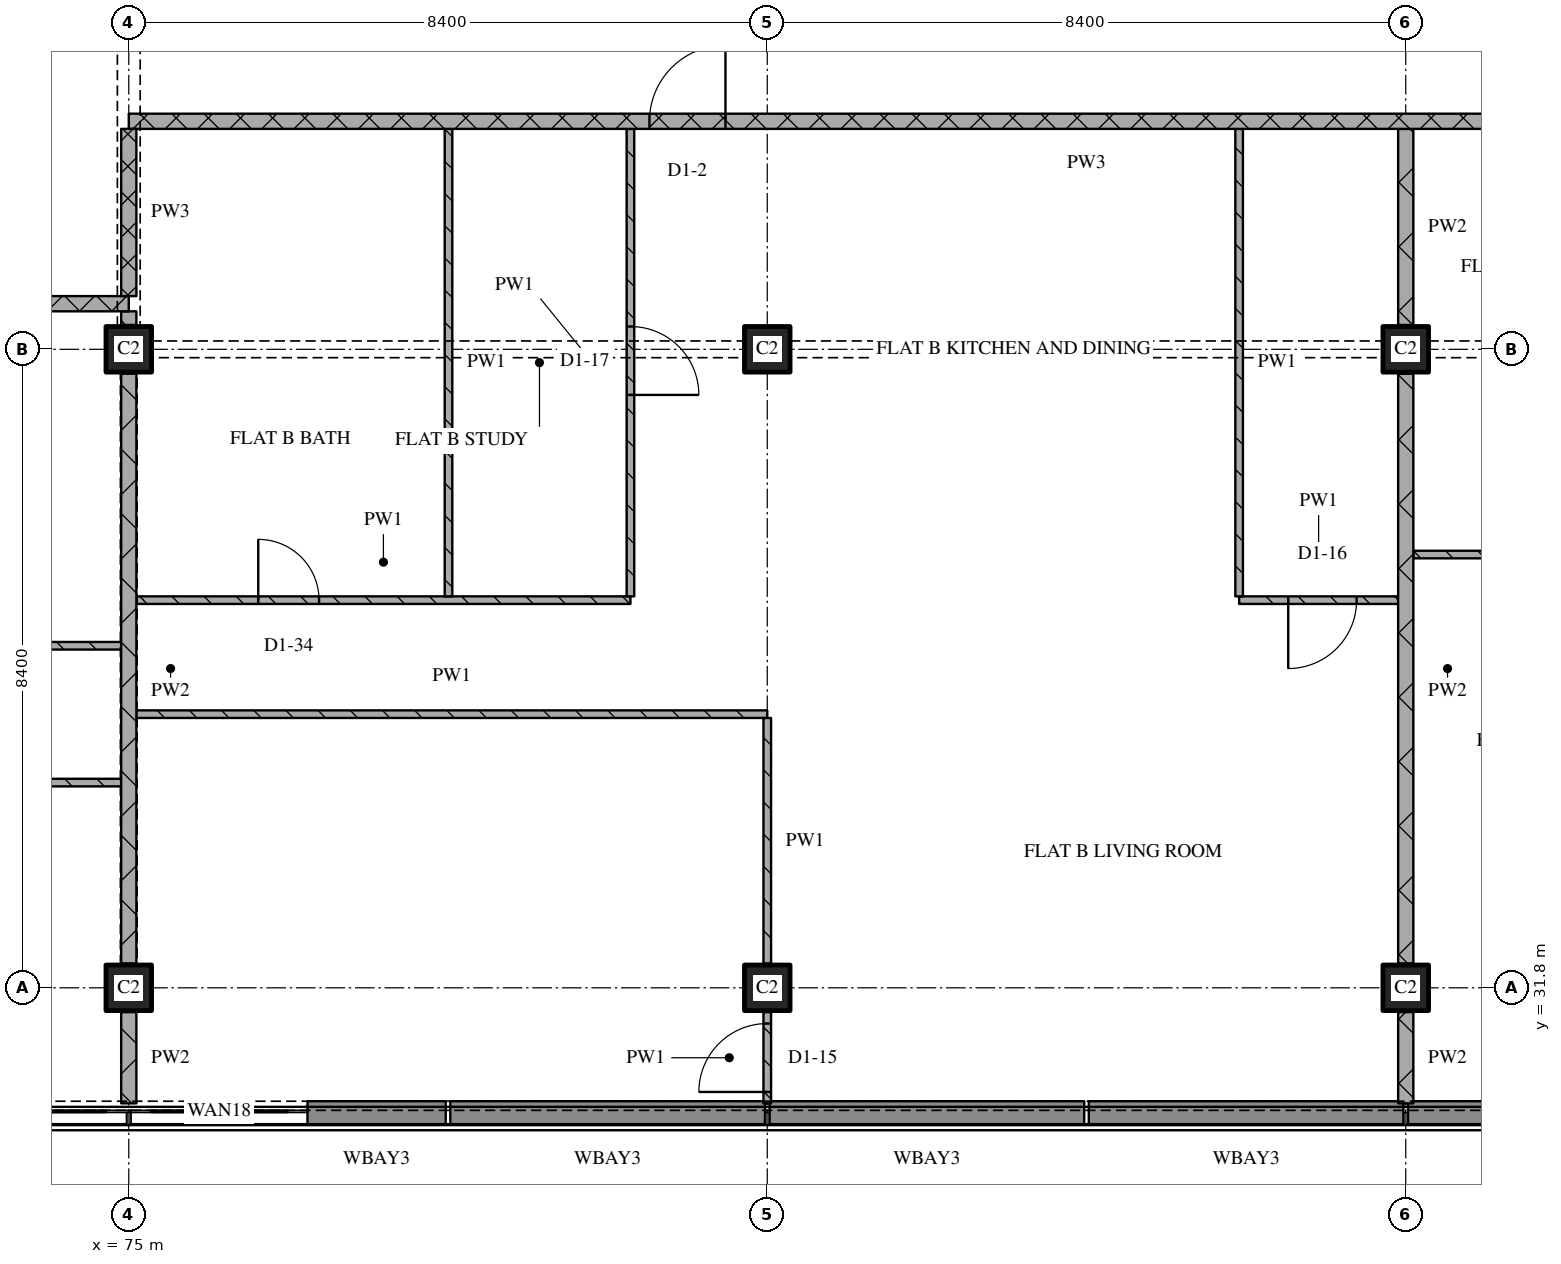
"""IFC4 building model, lengths in metres.
Left out: names, types, materials, properties, quantities, classifications, styles, units other than length and angle.
Written with IfcOpenShell. Run it as: python <this file> out.ifc"""

import sys

from ifc_helpers import new_model, si_unit, direction, frame, frame_2d, origin, origin_2d, place, context, subcontext, project, spatial, rectangle, extrude, element, fill, save


model = new_model("IFC4")
c1 = context("Model", 3, precision=1e-05, world=origin(), true_north=direction((0.0, 1.0)))
c2 = subcontext(c1, "Body", "Model", "MODEL_VIEW")
j1 = project(units=[si_unit("LENGTHUNIT", "METRE"), si_unit("PLANEANGLEUNIT", "RADIAN")], contexts=[c1])
p1 = place(None, origin())
s1 = spatial("IfcSite", under=j1, at=p1, CompositionType="ELEMENT")
p2 = place(p1, origin())
s2 = spatial("IfcBuilding", under=s1, at=p2, CompositionType="ELEMENT")
p3 = place(p2, frame((0.0, 0.0, 205.5)))
s3 = spatial("IfcBuildingStorey", under=s2, at=p3, CompositionType="ELEMENT", Elevation=205.5)
for number, where, z_axis, x_axis in (
    (1, (75.0, 31.8, 0.0), (0.0, 0.0, 1.0), (1.0, 0.0, 0.0)),
    (2, (75.0, 40.2, 0.0), (0.0, 0.0, 1.0), (1.0, 0.0, 0.0)),
    (3, (83.4, 31.8, 0.0), (0.0, 0.0, 1.0), (1.0, 0.0, 0.0)),
    (4, (83.4, 40.2, 0.0), (0.0, 0.0, 1.0), (1.0, 0.0, 0.0)),
    (5, (91.8, 31.8, 0.0), (0.0, 0.0, 1.0), (1.0, 0.0, 0.0)),
    (6, (91.8, 40.2, 0.0), (0.0, 0.0, 1.0), (1.0, 0.0, 0.0)),
):
    element("IfcColumn", number, at=place(p3, frame(where, z_axis=z_axis, x_axis=x_axis)), inside=s3, PredefinedType="COLUMN", context=c2, shape_type="SweptSolid", body=[
        extrude(rectangle(XDim=0.6, YDim=0.6, at=origin_2d()), origin(), (0.0, 0.0, 1.0), 3.6),
    ])
p4 = place(p3, frame((79.17, 30.154, 0.0), z_axis=(0.0, 0.0, 1.0), x_axis=(-1.0, 0.0, 0.0)))
e7 = element("IfcWall", 7, at=p4, inside=s3, PredefinedType="SOLIDWALL", context=c2, shape_type="SweptSolid", body=[
    extrude(rectangle(XDim=1.819, YDim=0.308, at=frame_2d((0.91, 0.0))), origin(), (0.0, 0.0, 1.0), 3.2),
])
for number, where, z_axis, x_axis in (
    (8, (83.37, 30.154, 0.0), (0.0, 0.0, 1.0), (-1.0, 0.0, 0.0)),
    (9, (87.57, 30.154, 0.0), (0.0, 0.0, 1.0), (-1.0, 0.0, 0.0)),
    (10, (91.77, 30.154, 0.0), (0.0, 0.0, 1.0), (-1.0, 0.0, 0.0)),
):
    element("IfcWall", number, at=place(p3, frame(where, z_axis=z_axis, x_axis=x_axis)), inside=s3, PredefinedType="SOLIDWALL", context=c2, shape_type="SweptSolid", body=[
        extrude(rectangle(XDim=4.14, YDim=0.308, at=frame_2d((2.07, 0.0))), origin(), (0.0, 0.0, 1.0), 3.2),
    ])
p5 = place(p3, frame((95.97, 30.154, 0.0), z_axis=(0.0, 0.0, 1.0), x_axis=(-1.0, 0.0, 0.0)))
e11 = element("IfcWall", 11, at=p5, inside=s3, PredefinedType="SOLIDWALL", context=c2, shape_type="SweptSolid", body=[
    extrude(rectangle(XDim=4.14, YDim=0.308, at=frame_2d((2.07, 0.0))), origin(), (0.0, 0.0, 1.0), 3.2),
])
p6 = place(p3, frame((74.9, 34.5, 0.0), z_axis=(0.0, 0.0, 1.0), x_axis=(-1.0, 0.0, 0.0)))
e12 = element("IfcWall", 12, at=p6, inside=s3, PredefinedType="PARTITIONING", context=c2, shape_type="SweptSolid", body=[
    extrude(rectangle(XDim=12.5, YDim=0.1, at=frame_2d((6.25, 0.0))), origin(), (0.0, 0.0, 1.0), 3.32),
])
p7 = place(p6, frame((1.55, 0.0, 0.0)))
e13 = element("IfcOpeningElement", 13, at=p7, cuts=e12, PredefinedType="OPENING", context=c2, shape_type="SweptSolid", body=[
    extrude(rectangle(XDim=0.9, YDim=2.1, at=frame_2d((0.45, 1.05))), frame((0.0, 0.06, 0.0), z_axis=(0.0, -1.0, 0.0), x_axis=(1.0, 0.0, 0.0)), (0.0, 0.0, 1.0), 0.12),
])
p8 = place(p6, frame((7.85, 0.0, 0.0)))
e14 = element("IfcOpeningElement", 14, at=p8, cuts=e12, PredefinedType="OPENING", context=c2, shape_type="SweptSolid", body=[
    extrude(rectangle(XDim=0.9, YDim=2.1, at=frame_2d((0.45, 1.05))), frame((0.0, 0.06, 0.0), z_axis=(0.0, -1.0, 0.0), x_axis=(1.0, 0.0, 0.0)), (0.0, 0.0, 1.0), 0.12),
])
p9 = place(p3, frame((75.1, 35.4, 0.0), z_axis=(0.0, 0.0, 1.0), x_axis=(1.0, 0.0, 0.0)))
e15 = element("IfcWall", 15, at=p9, inside=s3, PredefinedType="PARTITIONING", context=c2, shape_type="SweptSolid", body=[
    extrude(rectangle(XDim=8.3, YDim=0.1, at=frame_2d((4.15, 0.0))), origin(), (0.0, 0.0, 1.0), 3.32),
])
p10 = place(p3, frame((68.4, 36.3, 0.0), z_axis=(0.0, 0.0, 1.0), x_axis=(1.0, 0.0, 0.0)))
e16 = element("IfcWall", 16, at=p10, inside=s3, PredefinedType="PARTITIONING", context=c2, shape_type="SweptSolid", body=[
    extrude(rectangle(XDim=6.5, YDim=0.1, at=frame_2d((3.25, 0.0))), origin(), (0.0, 0.0, 1.0), 3.32),
])
p11 = place(p10, frame((2.85, 0.0, 0.0)))
e17 = element("IfcOpeningElement", 17, at=p11, cuts=e16, PredefinedType="OPENING", context=c2, shape_type="SweptSolid", body=[
    extrude(rectangle(XDim=0.9, YDim=2.1, at=frame_2d((0.45, 1.05))), frame((0.0, 0.06, 0.0), z_axis=(0.0, -1.0, 0.0), x_axis=(1.0, 0.0, 0.0)), (0.0, 0.0, 1.0), 0.12),
])
p12 = place(p3, frame((75.1, 36.9, 0.0), z_axis=(0.0, 0.0, 1.0), x_axis=(1.0, 0.0, 0.0)))
e18 = element("IfcWall", 18, at=p12, inside=s3, PredefinedType="PARTITIONING", context=c2, shape_type="SweptSolid", body=[
    extrude(rectangle(XDim=6.5, YDim=0.1, at=frame_2d((3.25, 0.0))), origin(), (0.0, 0.0, 1.0), 3.32),
])
p13 = place(p12, frame((1.603, 0.0, 0.0)))
e19 = element("IfcOpeningElement", 19, at=p13, cuts=e18, PredefinedType="OPENING", context=c2, shape_type="SweptSolid", body=[
    extrude(rectangle(XDim=0.8, YDim=2.1, at=frame_2d((0.4, 1.05))), frame((0.0, 0.06, 0.0), z_axis=(0.0, -1.0, 0.0), x_axis=(1.0, 0.0, 0.0)), (0.0, 0.0, 1.0), 0.12),
])
p14 = place(p3, frame((89.608, 36.9, 0.0), z_axis=(0.0, 0.0, 1.0), x_axis=(1.0, 0.0, 0.0)))
e20 = element("IfcWall", 20, at=p14, inside=s3, PredefinedType="PARTITIONING", context=c2, shape_type="SweptSolid", body=[
    extrude(rectangle(XDim=2.092, YDim=0.1, at=frame_2d((1.046, 0.0))), origin(), (0.0, 0.0, 1.0), 3.32),
])
p15 = place(p14, frame((0.646, 0.0, 0.0)))
e21 = element("IfcOpeningElement", 21, at=p15, cuts=e20, PredefinedType="OPENING", context=c2, shape_type="SweptSolid", body=[
    extrude(rectangle(XDim=0.9, YDim=2.1, at=frame_2d((0.45, 1.05))), frame((0.0, 0.06, 0.0), z_axis=(0.0, -1.0, 0.0), x_axis=(1.0, 0.0, 0.0)), (0.0, 0.0, 1.0), 0.12),
])
p16 = place(p3, frame((91.9, 37.5, 0.0), z_axis=(0.0, 0.0, 1.0), x_axis=(1.0, 0.0, 0.0)))
e22 = element("IfcWall", 22, at=p16, inside=s3, PredefinedType="PARTITIONING", context=c2, shape_type="SweptSolid", body=[
    extrude(rectangle(XDim=2.9, YDim=0.1, at=frame_2d((1.45, 0.0))), origin(), (0.0, 0.0, 1.0), 3.32),
])
p17 = place(p16, frame((1.0, 0.0, 0.0)))
e23 = element("IfcOpeningElement", 23, at=p17, cuts=e22, PredefinedType="OPENING", context=c2, shape_type="SweptSolid", body=[
    extrude(rectangle(XDim=0.8, YDim=2.1, at=frame_2d((0.4, 1.05))), frame((0.0, 0.06, 0.0), z_axis=(0.0, -1.0, 0.0), x_axis=(1.0, 0.0, 0.0)), (0.0, 0.0, 1.0), 0.12),
])
p18 = place(p3, frame((75.0, 40.8, 0.0), z_axis=(0.0, 0.0, 1.0), x_axis=(-1.0, 0.0, 0.0)))
e24 = element("IfcWall", 24, at=p18, inside=s3, PredefinedType="PARTITIONING", context=c2, shape_type="SweptSolid", body=[
    extrude(rectangle(XDim=24.38, YDim=0.2, at=frame_2d((12.19, 0.0))), origin(), (0.0, 0.0, 1.0), 3.32),
])
p19 = place(p18, frame((14.35, 0.0, 0.0)))
e25 = element("IfcOpeningElement", 25, at=p19, cuts=e24, PredefinedType="OPENING", context=c2, shape_type="SweptSolid", body=[
    extrude(rectangle(XDim=1.0, YDim=2.1, at=frame_2d((0.5, 1.05))), frame((0.0, 0.11, 0.0), z_axis=(0.0, -1.0, 0.0), x_axis=(1.0, 0.0, 0.0)), (0.0, 0.0, 1.0), 0.22),
])
p20 = place(p3, frame((100.2, 43.2, 0.0), z_axis=(0.0, 0.0, 1.0), x_axis=(-1.0, 0.0, 0.0)))
e26 = element("IfcWall", 26, at=p20, inside=s3, PredefinedType="PARTITIONING", context=c2, shape_type="SweptSolid", body=[
    extrude(rectangle(XDim=25.2, YDim=0.2, at=frame_2d((12.6, 0.0))), origin(), (0.0, 0.0, 1.0), 3.32),
])
p21 = place(p20, frame((4.15, 0.0, 0.0)))
e27 = element("IfcOpeningElement", 27, at=p21, cuts=e26, PredefinedType="OPENING", context=c2, shape_type="SweptSolid", body=[
    extrude(rectangle(XDim=1.0, YDim=2.1, at=frame_2d((0.5, 1.05))), frame((0.0, 0.11, 0.0), z_axis=(0.0, -1.0, 0.0), x_axis=(1.0, 0.0, 0.0)), (0.0, 0.0, 1.0), 0.22),
])
p22 = place(p20, frame((17.35, 0.0, 0.0)))
e28 = element("IfcOpeningElement", 28, at=p22, cuts=e26, PredefinedType="OPENING", context=c2, shape_type="SweptSolid", body=[
    extrude(rectangle(XDim=1.0, YDim=2.1, at=frame_2d((0.5, 1.05))), frame((0.0, 0.11, 0.0), z_axis=(0.0, -1.0, 0.0), x_axis=(1.0, 0.0, 0.0)), (0.0, 0.0, 1.0), 0.22),
])
p23 = place(p3, frame((75.0, 43.1, 0.0), z_axis=(0.0, 0.0, 1.0), x_axis=(0.0, -1.0, 0.0)))
e29 = element("IfcWall", 29, at=p23, inside=s3, PredefinedType="PARTITIONING", context=c2, shape_type="SweptSolid", body=[
    extrude(rectangle(XDim=2.2, YDim=0.2, at=frame_2d((1.1, 0.0))), origin(), (0.0, 0.0, 1.0), 2.53),
])
p24 = place(p3, frame((75.0, 31.48, 0.0), z_axis=(0.0, 0.0, 1.0), x_axis=(0.0, -1.0, 0.0)))
e30 = element("IfcWall", 30, at=p24, inside=s3, PredefinedType="PARTITIONING", context=c2, shape_type="SweptSolid", body=[
    extrude(rectangle(XDim=1.2, YDim=0.2, at=frame_2d((0.6, 0.0))), origin(), (0.0, 0.0, 1.0), 3.32),
])
p25 = place(p3, frame((75.0, 39.88, 0.0), z_axis=(0.0, 0.0, 1.0), x_axis=(0.0, -1.0, 0.0)))
e31 = element("IfcWall", 31, at=p25, inside=s3, PredefinedType="PARTITIONING", context=c2, shape_type="SweptSolid", body=[
    extrude(rectangle(XDim=7.76, YDim=0.2, at=frame_2d((3.88, 0.0))), origin(), (0.0, 0.0, 1.0), 2.72),
])
p26 = place(p3, frame((75.0, 40.7, 0.0), z_axis=(0.0, 0.0, 1.0), x_axis=(0.0, -1.0, 0.0)))
e32 = element("IfcWall", 32, at=p26, inside=s3, PredefinedType="PARTITIONING", context=c2, shape_type="SweptSolid", body=[
    extrude(rectangle(XDim=0.18, YDim=0.2, at=frame_2d((0.09, 0.0))), origin(), (0.0, 0.0, 1.0), 3.32),
])
p27 = place(p3, frame((79.206, 43.1, 0.0), z_axis=(0.0, 0.0, 1.0), x_axis=(0.0, -1.0, 0.0)))
e33 = element("IfcWall", 33, at=p27, inside=s3, PredefinedType="PARTITIONING", context=c2, shape_type="SweptSolid", body=[
    extrude(rectangle(XDim=6.15, YDim=0.1, at=frame_2d((3.075, 0.0))), origin(), (0.0, 0.0, 1.0), 3.32),
])
p28 = place(p3, frame((81.6, 36.95, 0.0), z_axis=(0.0, 0.0, 1.0), x_axis=(0.0, 1.0, 0.0)))
e34 = element("IfcWall", 34, at=p28, inside=s3, PredefinedType="PARTITIONING", context=c2, shape_type="SweptSolid", body=[
    extrude(rectangle(XDim=6.15, YDim=0.1, at=frame_2d((3.075, 0.0))), origin(), (0.0, 0.0, 1.0), 3.32),
])
p29 = place(p28, frame((2.65, 0.0, 0.0)))
e35 = element("IfcOpeningElement", 35, at=p29, cuts=e34, PredefinedType="OPENING", context=c2, shape_type="SweptSolid", body=[
    extrude(rectangle(XDim=0.9, YDim=2.1, at=frame_2d((0.45, 1.05))), frame((0.0, 0.06, 0.0), z_axis=(0.0, -1.0, 0.0), x_axis=(1.0, 0.0, 0.0)), (0.0, 0.0, 1.0), 0.12),
])
p30 = place(p3, frame((83.4, 30.28, 0.0), z_axis=(0.0, 0.0, 1.0), x_axis=(0.0, 1.0, 0.0)))
e36 = element("IfcWall", 36, at=p30, inside=s3, PredefinedType="PARTITIONING", context=c2, shape_type="SweptSolid", body=[
    extrude(rectangle(XDim=1.2, YDim=0.1, at=frame_2d((0.6, 0.0))), origin(), (0.0, 0.0, 1.0), 3.32),
])
p31 = place(p30, frame((0.15, 0.0, 0.0)))
e37 = element("IfcOpeningElement", 37, at=p31, cuts=e36, PredefinedType="OPENING", context=c2, shape_type="SweptSolid", body=[
    extrude(rectangle(XDim=0.9, YDim=2.1, at=frame_2d((0.45, 1.05))), frame((0.0, 0.06, 0.0), z_axis=(0.0, -1.0, 0.0), x_axis=(1.0, 0.0, 0.0)), (0.0, 0.0, 1.0), 0.12),
])
p32 = place(p3, frame((83.4, 35.35, 0.0), z_axis=(0.0, 0.0, 1.0), x_axis=(0.0, -1.0, 0.0)))
e38 = element("IfcWall", 38, at=p32, inside=s3, PredefinedType="PARTITIONING", context=c2, shape_type="SweptSolid", body=[
    extrude(rectangle(XDim=3.23, YDim=0.1, at=frame_2d((1.615, 0.0))), origin(), (0.0, 0.0, 1.0), 3.32),
])
p33 = place(p3, frame((89.608, 43.1, 0.0), z_axis=(0.0, 0.0, 1.0), x_axis=(0.0, -1.0, 0.0)))
e39 = element("IfcWall", 39, at=p33, inside=s3, PredefinedType="PARTITIONING", context=c2, shape_type="SweptSolid", body=[
    extrude(rectangle(XDim=6.15, YDim=0.1, at=frame_2d((3.075, 0.0))), origin(), (0.0, 0.0, 1.0), 3.32),
])
p34 = place(p3, frame((91.8, 31.48, 0.0), z_axis=(0.0, 0.0, 1.0), x_axis=(0.0, -1.0, 0.0)))
e40 = element("IfcWall", 40, at=p34, inside=s3, PredefinedType="PARTITIONING", context=c2, shape_type="SweptSolid", body=[
    extrude(rectangle(XDim=1.2, YDim=0.2, at=frame_2d((0.6, 0.0))), origin(), (0.0, 0.0, 1.0), 3.32),
])
p35 = place(p3, frame((91.8, 39.88, 0.0), z_axis=(0.0, 0.0, 1.0), x_axis=(0.0, -1.0, 0.0)))
e41 = element("IfcWall", 41, at=p35, inside=s3, PredefinedType="PARTITIONING", context=c2, shape_type="SweptSolid", body=[
    extrude(rectangle(XDim=7.76, YDim=0.2, at=frame_2d((3.88, 0.0))), origin(), (0.0, 0.0, 1.0), 3.32),
])
p36 = place(p3, frame((91.8, 43.1, 0.0), z_axis=(0.0, 0.0, 1.0), x_axis=(0.0, -1.0, 0.0)))
e42 = element("IfcWall", 42, at=p36, inside=s3, PredefinedType="PARTITIONING", context=c2, shape_type="SweptSolid", body=[
    extrude(rectangle(XDim=2.58, YDim=0.2, at=frame_2d((1.29, 0.0))), origin(), (0.0, 0.0, 1.0), 3.32),
])
p37 = place(p13, origin())
e43 = element("IfcDoor", 43, at=p37, inside=s3, OperationType="SINGLE_SWING_LEFT", PredefinedType="DOOR", context=c2, shape_type="SweptSolid", body=[
    extrude(rectangle(XDim=0.8, YDim=2.1, at=frame_2d((0.4, 1.05))), frame((0.0, 0.025, 0.0), z_axis=(0.0, -1.0, 0.0), x_axis=(1.0, 0.0, 0.0)), (0.0, 0.0, 1.0), 0.05),
])
fill(e19, e43)
p38 = place(p15, origin())
e44 = element("IfcDoor", 44, at=p38, inside=s3, OperationType="SINGLE_SWING_RIGHT", PredefinedType="DOOR", context=c2, shape_type="SweptSolid", body=[
    extrude(rectangle(XDim=0.9, YDim=2.1, at=frame_2d((0.45, 1.05))), frame((0.0, 0.025, 0.0), z_axis=(0.0, -1.0, 0.0), x_axis=(1.0, 0.0, 0.0)), (0.0, 0.0, 1.0), 0.05),
])
fill(e21, e44)
p39 = place(p22, origin())
e45 = element("IfcDoor", 45, at=p39, inside=s3, OperationType="SINGLE_SWING_RIGHT", PredefinedType="DOOR", context=c2, shape_type="SweptSolid", body=[
    extrude(rectangle(XDim=1.0, YDim=2.1, at=frame_2d((0.5, 1.05))), frame((0.0, 0.025, 0.0), z_axis=(0.0, -1.0, 0.0), x_axis=(1.0, 0.0, 0.0)), (0.0, 0.0, 1.0), 0.05),
])
fill(e28, e45)
p40 = place(p29, origin())
e46 = element("IfcDoor", 46, at=p40, inside=s3, OperationType="SINGLE_SWING_RIGHT", PredefinedType="DOOR", context=c2, shape_type="SweptSolid", body=[
    extrude(rectangle(XDim=0.9, YDim=2.1, at=frame_2d((0.45, 1.05))), frame((0.0, 0.025, 0.0), z_axis=(0.0, -1.0, 0.0), x_axis=(1.0, 0.0, 0.0)), (0.0, 0.0, 1.0), 0.05),
])
fill(e35, e46)
p41 = place(p31, origin())
e47 = element("IfcDoor", 47, at=p41, inside=s3, OperationType="SINGLE_SWING_LEFT", PredefinedType="DOOR", context=c2, shape_type="SweptSolid", body=[
    extrude(rectangle(XDim=0.9, YDim=2.1, at=frame_2d((0.45, 1.05))), frame((0.0, 0.025, 0.0), z_axis=(0.0, -1.0, 0.0), x_axis=(1.0, 0.0, 0.0)), (0.0, 0.0, 1.0), 0.05),
])
fill(e37, e47)
save(model, sys.argv[1])
